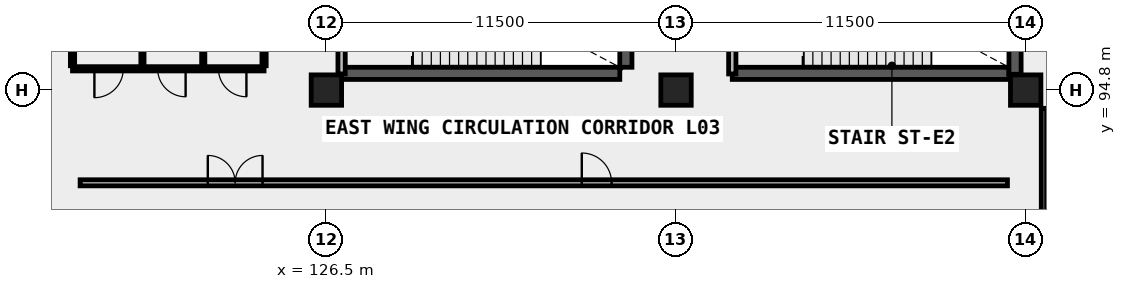
"""IFC4 building model, lengths in metres.
Left out: names, types, materials, properties, quantities, classifications, styles, units other than length and angle.
Written with IfcOpenShell. Run it as: python <this file> out.ifc"""

import sys

from ifc_helpers import new_model, si_unit, direction, frame, frame_2d, origin, origin_2d, place, context, subcontext, project, spatial, rectangle, extrude, element, fill, save


model = new_model("IFC4")
c1 = context("Model", 3, precision=1e-05, world=origin(), true_north=direction((0.0, 1.0)))
c2 = subcontext(c1, "Body", "Model", "MODEL_VIEW")
j1 = project(units=[si_unit("LENGTHUNIT", "METRE"), si_unit("PLANEANGLEUNIT", "RADIAN")], contexts=[c1])
p1 = place(None, origin())
s1 = spatial("IfcSite", under=j1, at=p1, CompositionType="ELEMENT")
p2 = place(p1, origin())
s2 = spatial("IfcBuilding", under=s1, at=p2, CompositionType="ELEMENT")
p3 = place(p2, frame((0.0, 0.0, 13.8)))
s3 = spatial("IfcBuildingStorey", under=s2, at=p3, CompositionType="ELEMENT", Elevation=13.8)
for number, where, z_axis, x_axis in (
    (1, (126.5, 94.8, 0.0), (0.0, 0.0, 1.0), (1.0, 0.0, 0.0)),
    (2, (138.0, 94.8, 0.0), (0.0, 0.0, 1.0), (1.0, 0.0, 0.0)),
    (3, (149.5, 94.8, 0.0), (0.0, 0.0, 1.0), (1.0, 0.0, 0.0)),
):
    element("IfcColumn", number, at=place(p3, frame(where, z_axis=z_axis, x_axis=x_axis)), inside=s3, PredefinedType="COLUMN", context=c2, shape_type="SweptSolid", body=[
        extrude(rectangle(XDim=1.0, YDim=1.0, at=origin_2d()), origin(), (0.0, 0.0, 1.0), 4.5),
    ])
p4 = place(p3, frame((127.0, 95.35, 0.0), z_axis=(0.0, 0.0, 1.0), x_axis=(1.0, 0.0, 0.0)))
e4 = element("IfcWall", 4, at=p4, inside=s3, PredefinedType="SHEAR", context=c2, shape_type="SweptSolid", body=[
    extrude(rectangle(XDim=9.15, YDim=0.4, at=frame_2d((4.575, 0.0))), origin(), (0.0, 0.0, 1.0), 4.5),
])
p5 = place(p3, frame((136.35, 95.55, 0.0), z_axis=(0.0, 0.0, 1.0), x_axis=(0.0, 1.0, 0.0)))
e5 = element("IfcWall", 5, at=p5, inside=s3, PredefinedType="SHEAR", context=c2, shape_type="SweptSolid", body=[
    extrude(rectangle(XDim=3.6, YDim=0.4, at=frame_2d((1.8, 0.0))), origin(), (0.0, 0.0, 1.0), 4.5),
])
p6 = place(p3, frame((139.85, 95.35, 0.0), z_axis=(0.0, 0.0, 1.0), x_axis=(1.0, 0.0, 0.0)))
e6 = element("IfcWall", 6, at=p6, inside=s3, PredefinedType="SHEAR", context=c2, shape_type="SweptSolid", body=[
    extrude(rectangle(XDim=9.1, YDim=0.4, at=frame_2d((4.55, 0.0))), origin(), (0.0, 0.0, 1.0), 4.5),
])
p7 = place(p3, frame((149.15, 95.32, 0.0), z_axis=(0.0, 0.0, 1.0), x_axis=(0.0, 1.0, 0.0)))
e7 = element("IfcWall", 7, at=p7, inside=s3, PredefinedType="SHEAR", context=c2, shape_type="SweptSolid", body=[
    extrude(rectangle(XDim=3.83, YDim=0.4, at=frame_2d((1.915, 0.0))), origin(), (0.0, 0.0, 1.0), 4.5),
])
p8 = place(p3, frame((127.0, 95.33, 0.0), z_axis=(0.0, 0.0, 1.0), x_axis=(0.0, 1.0, 0.0)))
e8 = element("IfcWall", 8, at=p8, inside=s3, PredefinedType="SOLIDWALL", context=c2, shape_type="SweptSolid", body=[
    extrude(rectangle(XDim=4.04, YDim=0.24, at=frame_2d((2.02, 0.0))), origin(), (0.0, 0.0, 1.0), 4.22),
])
p9 = place(p8, frame((1.45, 0.0, 0.0)))
e9 = element("IfcOpeningElement", 9, at=p9, cuts=e8, PredefinedType="OPENING", context=c2, shape_type="SweptSolid", body=[
    extrude(rectangle(XDim=1.13, YDim=2.15, at=frame_2d((0.565, 1.075))), frame((0.0, 0.13, 0.0), z_axis=(0.0, -1.0, 0.0), x_axis=(1.0, 0.0, 0.0)), (0.0, 0.0, 1.0), 0.26),
])
p10 = place(p3, frame((139.85, 95.33, 0.0), z_axis=(0.0, 0.0, 1.0), x_axis=(0.0, 1.0, 0.0)))
e10 = element("IfcWall", 10, at=p10, inside=s3, PredefinedType="SOLIDWALL", context=c2, shape_type="SweptSolid", body=[
    extrude(rectangle(XDim=4.04, YDim=0.24, at=frame_2d((2.02, 0.0))), origin(), (0.0, 0.0, 1.0), 4.22),
])
p11 = place(p10, frame((1.45, 0.0, 0.0)))
e11 = element("IfcOpeningElement", 11, at=p11, cuts=e10, PredefinedType="OPENING", context=c2, shape_type="SweptSolid", body=[
    extrude(rectangle(XDim=1.13, YDim=2.15, at=frame_2d((0.565, 1.075))), frame((0.0, 0.13, 0.0), z_axis=(0.0, -1.0, 0.0), x_axis=(1.0, 0.0, 0.0)), (0.0, 0.0, 1.0), 0.26),
])
p12 = place(p3, frame((118.15, 95.5, 0.0), z_axis=(0.0, 0.0, 1.0), x_axis=(1.0, 0.0, 0.0)))
e12 = element("IfcWall", 12, at=p12, inside=s3, PredefinedType="PLUMBINGWALL", context=c2, shape_type="SweptSolid", body=[
    extrude(rectangle(XDim=6.3, YDim=0.14, at=frame_2d((3.15, 0.0))), origin(), (0.0, 0.0, 1.0), 4.22),
])
p13 = place(p12, frame((0.72, 0.0, 0.0)))
e13 = element("IfcOpeningElement", 13, at=p13, cuts=e12, PredefinedType="OPENING", context=c2, shape_type="SweptSolid", body=[
    extrude(rectangle(XDim=0.95, YDim=2.1, at=frame_2d((0.475, 1.05))), frame((0.0, 0.08, 0.0), z_axis=(0.0, -1.0, 0.0), x_axis=(1.0, 0.0, 0.0)), (0.0, 0.0, 1.0), 0.16),
])
p14 = place(p12, frame((2.8, 0.0, 0.0)))
e14 = element("IfcOpeningElement", 14, at=p14, cuts=e12, PredefinedType="OPENING", context=c2, shape_type="SweptSolid", body=[
    extrude(rectangle(XDim=0.92, YDim=2.1, at=frame_2d((0.46, 1.05))), frame((0.0, 0.08, 0.0), z_axis=(0.0, -1.0, 0.0), x_axis=(1.0, 0.0, 0.0)), (0.0, 0.0, 1.0), 0.16),
])
p15 = place(p12, frame((4.8, 0.0, 0.0)))
e15 = element("IfcOpeningElement", 15, at=p15, cuts=e12, PredefinedType="OPENING", context=c2, shape_type="SweptSolid", body=[
    extrude(rectangle(XDim=0.92, YDim=2.1, at=frame_2d((0.46, 1.05))), frame((0.0, 0.08, 0.0), z_axis=(0.0, -1.0, 0.0), x_axis=(1.0, 0.0, 0.0)), (0.0, 0.0, 1.0), 0.16),
])
p16 = place(p3, frame((118.15, 95.6, 0.0), z_axis=(0.0, 0.0, 1.0), x_axis=(0.0, 1.0, 0.0)))
e16 = element("IfcWall", 16, at=p16, inside=s3, PredefinedType="PLUMBINGWALL", context=c2, shape_type="SweptSolid", body=[
    extrude(rectangle(XDim=2.85, YDim=0.14, at=frame_2d((1.425, 0.0))), origin(), (0.0, 0.0, 1.0), 4.22),
])
for number, where, z_axis, x_axis in (
    (17, (120.45, 95.6, 0.0), (0.0, 0.0, 1.0), (0.0, 1.0, 0.0)),
    (18, (122.45, 95.6, 0.0), (0.0, 0.0, 1.0), (0.0, 1.0, 0.0)),
):
    element("IfcWall", number, at=place(p3, frame(where, z_axis=z_axis, x_axis=x_axis)), inside=s3, PredefinedType="PARTITIONING", context=c2, shape_type="SweptSolid", body=[
        extrude(rectangle(XDim=2.85, YDim=0.105, at=frame_2d((1.425, 0.0))), origin(), (0.0, 0.0, 1.0), 4.22),
    ])
p17 = place(p3, frame((124.45, 95.6, 0.0), z_axis=(0.0, 0.0, 1.0), x_axis=(0.0, 1.0, 0.0)))
e19 = element("IfcWall", 19, at=p17, inside=s3, PredefinedType="PLUMBINGWALL", context=c2, shape_type="SweptSolid", body=[
    extrude(rectangle(XDim=2.85, YDim=0.14, at=frame_2d((1.425, 0.0))), origin(), (0.0, 0.0, 1.0), 4.22),
])
p18 = place(p3, frame((118.4, 91.75, 0.0), z_axis=(0.0, 0.0, 1.0), x_axis=(1.0, 0.0, 0.0)))
e20 = element("IfcWall", 20, at=p18, inside=s3, PredefinedType="PARTITIONING", context=c2, shape_type="SweptSolid", body=[
    extrude(rectangle(XDim=30.5, YDim=0.2, at=frame_2d((15.25, 0.0))), origin(), (0.0, 0.0, 1.0), 4.22),
])
p19 = place(p18, frame((4.2, 0.0, 0.0)))
e21 = element("IfcOpeningElement", 21, at=p19, cuts=e20, PredefinedType="OPENING", context=c2, shape_type="SweptSolid", body=[
    extrude(rectangle(XDim=1.8, YDim=2.2, at=frame_2d((0.9, 1.1))), frame((0.0, 0.11, 0.0), z_axis=(0.0, -1.0, 0.0), x_axis=(1.0, 0.0, 0.0)), (0.0, 0.0, 1.0), 0.22),
])
p20 = place(p18, frame((16.5, 0.0, 0.0)))
e22 = element("IfcOpeningElement", 22, at=p20, cuts=e20, PredefinedType="OPENING", context=c2, shape_type="SweptSolid", body=[
    extrude(rectangle(XDim=0.98, YDim=2.15, at=frame_2d((0.49, 1.075))), frame((0.0, 0.11, 0.0), z_axis=(0.0, -1.0, 0.0), x_axis=(1.0, 0.0, 0.0)), (0.0, 0.0, 1.0), 0.22),
])
p21 = place(p3, frame((150.1, 86.4, 0.0), z_axis=(0.0, 0.0, 1.0), x_axis=(0.0, 1.0, 0.0)))
e23 = element("IfcWall", 23, at=p21, inside=s3, PredefinedType="PARTITIONING", context=c2, shape_type="SweptSolid", body=[
    extrude(rectangle(XDim=7.8, YDim=0.175, at=frame_2d((3.9, 0.0))), origin(), (0.0, 0.0, 1.0), 4.22),
])
p22 = place(p21, frame((2.8, 0.0, 0.0)))
e24 = element("IfcOpeningElement", 24, at=p22, cuts=e23, PredefinedType="OPENING", context=c2, shape_type="SweptSolid", body=[
    extrude(rectangle(XDim=1.02, YDim=2.15, at=frame_2d((0.51, 1.075))), frame((0.0, 0.098, 0.0), z_axis=(0.0, -1.0, 0.0), x_axis=(1.0, 0.0, 0.0)), (0.0, 0.0, 1.0), 0.195),
])
p23 = place(p13, frame((0.475, 0.0, 0.0), z_axis=(0.0, 0.0, 1.0), x_axis=(-1.0, 0.0, 0.0)))
e25 = element("IfcDoor", 25, at=p23, inside=s3, OperationType="SINGLE_SWING_LEFT", PredefinedType="DOOR", context=c2, shape_type="SweptSolid", body=[
    extrude(rectangle(XDim=0.95, YDim=2.1, at=frame_2d((0.0, 1.05))), frame((0.0, 0.025, 0.0), z_axis=(0.0, -1.0, 0.0), x_axis=(1.0, 0.0, 0.0)), (0.0, 0.0, 1.0), 0.05),
])
fill(e13, e25)
p24 = place(p14, origin())
e26 = element("IfcDoor", 26, at=p24, inside=s3, OperationType="SINGLE_SWING_RIGHT", PredefinedType="DOOR", context=c2, shape_type="SweptSolid", body=[
    extrude(rectangle(XDim=0.92, YDim=2.1, at=frame_2d((0.46, 1.05))), frame((0.0, 0.025, 0.0), z_axis=(0.0, -1.0, 0.0), x_axis=(1.0, 0.0, 0.0)), (0.0, 0.0, 1.0), 0.05),
])
fill(e14, e26)
p25 = place(p15, origin())
e27 = element("IfcDoor", 27, at=p25, inside=s3, OperationType="SINGLE_SWING_RIGHT", PredefinedType="DOOR", context=c2, shape_type="SweptSolid", body=[
    extrude(rectangle(XDim=0.92, YDim=2.1, at=frame_2d((0.46, 1.05))), frame((0.0, 0.025, 0.0), z_axis=(0.0, -1.0, 0.0), x_axis=(1.0, 0.0, 0.0)), (0.0, 0.0, 1.0), 0.05),
])
fill(e15, e27)
p26 = place(p19, origin())
e28 = element("IfcDoor", 28, at=p26, inside=s3, OperationType="DOUBLE_DOOR_SINGLE_SWING", PredefinedType="DOOR", context=c2, shape_type="SweptSolid", body=[
    extrude(rectangle(XDim=1.8, YDim=2.2, at=frame_2d((0.9, 1.1))), frame((0.0, 0.025, 0.0), z_axis=(0.0, -1.0, 0.0), x_axis=(1.0, 0.0, 0.0)), (0.0, 0.0, 1.0), 0.05),
])
fill(e21, e28)
p27 = place(p20, origin())
e29 = element("IfcDoor", 29, at=p27, inside=s3, OperationType="SINGLE_SWING_LEFT", PredefinedType="DOOR", context=c2, shape_type="SweptSolid", body=[
    extrude(rectangle(XDim=0.98, YDim=2.15, at=frame_2d((0.49, 1.075))), frame((0.0, 0.025, 0.0), z_axis=(0.0, -1.0, 0.0), x_axis=(1.0, 0.0, 0.0)), (0.0, 0.0, 1.0), 0.05),
])
fill(e22, e29)
save(model, sys.argv[1])
